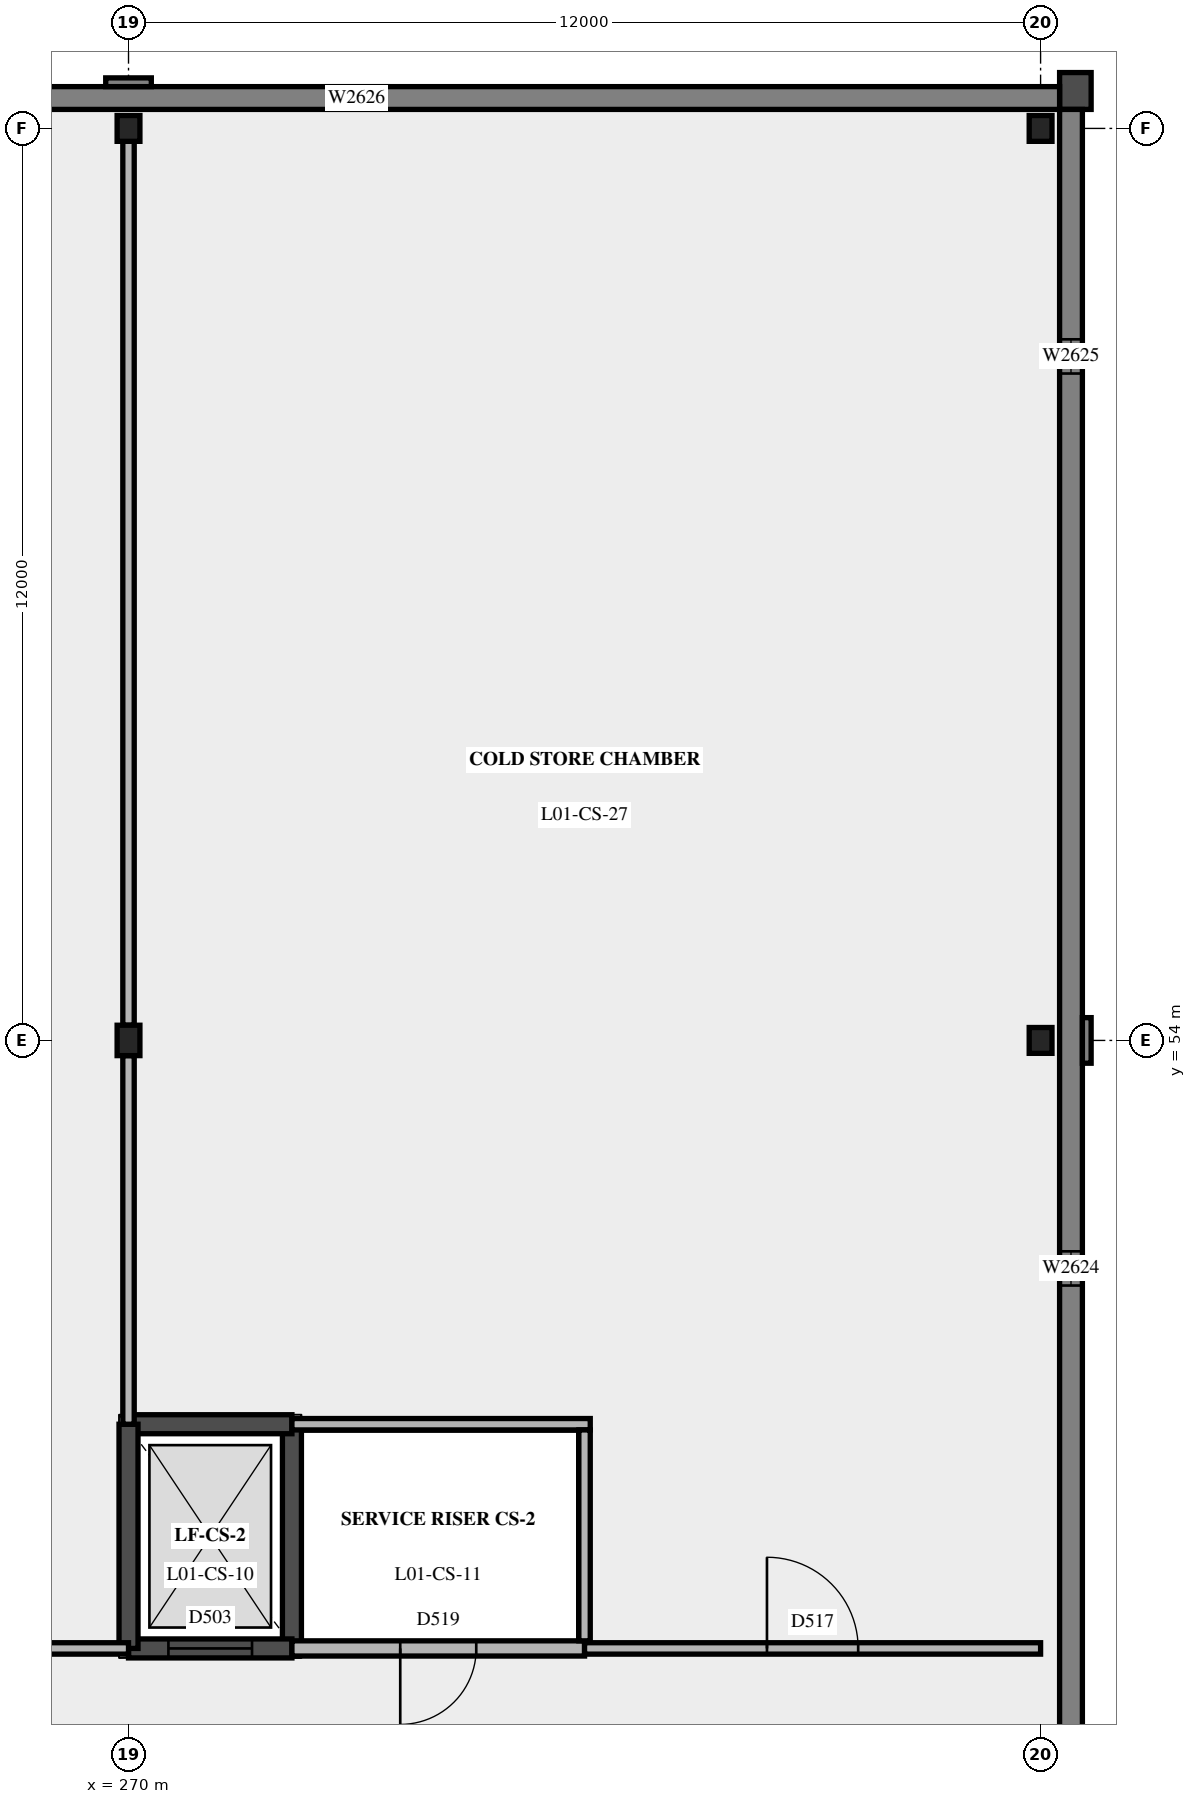
"""IFC4 building model, lengths in metres.
Left out: names, types, materials, properties, quantities, classifications, styles, units other than length and angle.
Written with IfcOpenShell. Run it as: python <this file> out.ifc"""

import sys

from ifc_helpers import new_model, si_unit, direction, frame, frame_2d, origin, origin_2d, place, context, subcontext, project, spatial, polyline, rectangle, i_section, outline, extrude, element, fill, save


model = new_model("IFC4")
c1 = context("Model", 3, precision=1e-05, world=origin(), true_north=direction((0.0, 1.0)))
c2 = subcontext(c1, "Body", "Model", "MODEL_VIEW")
j1 = project(units=[si_unit("LENGTHUNIT", "METRE"), si_unit("PLANEANGLEUNIT", "RADIAN")], contexts=[c1])
p1 = place(None, origin())
s1 = spatial("IfcSite", under=j1, at=p1, CompositionType="ELEMENT")
p2 = place(p1, origin())
s2 = spatial("IfcBuilding", under=s1, at=p2, CompositionType="ELEMENT")
p3 = place(p2, frame((0.0, 0.0, 5.4)))
s3 = spatial("IfcBuildingStorey", under=s2, at=p3, CompositionType="ELEMENT", Elevation=5.4)
p4 = place(p3, frame((270.0, 54.0, 0.0), z_axis=(0.0, 0.0, 1.0), x_axis=(1.0, 0.0, 0.0)))
e1 = element("IfcColumn", 1, at=p4, inside=s3, PredefinedType="COLUMN", context=c2, shape_type="SweptSolid", body=[
    extrude(i_section(OverallWidth=0.3, OverallDepth=0.4, WebThickness=0.013, FlangeThickness=0.024, at=origin_2d()), origin(), (0.0, 0.0, 1.0), 5.4),
])
for number, where, z_axis, x_axis in (
    (2, (270.0, 66.0, 0.0), (0.0, 0.0, 1.0), (1.0, 0.0, 0.0)),
    (3, (282.0, 54.0, 0.0), (0.0, 0.0, 1.0), (1.0, 0.0, 0.0)),
    (4, (282.0, 66.0, 0.0), (0.0, 0.0, 1.0), (1.0, 0.0, 0.0)),
):
    element("IfcColumn", number, at=place(p3, frame(where, z_axis=z_axis, x_axis=x_axis)), inside=s3, PredefinedType="COLUMN", context=c2, shape_type="SweptSolid", body=[
        extrude(i_section(OverallWidth=0.3, OverallDepth=0.34, WebThickness=0.012, FlangeThickness=0.021, at=origin_2d()), origin(), (0.0, 0.0, 1.0), 5.4),
    ])
p5 = place(p3, frame((282.25, 66.528, -0.39), z_axis=(0.0, 0.0, 1.0), x_axis=(1.0, 0.0, 0.0)))
e5 = element("IfcWall", 5, at=p5, inside=s3, PredefinedType="SOLIDWALL", context=c2, shape_type="SweptSolid", body=[
    extrude(rectangle(XDim=0.53, YDim=0.555, at=frame_2d((0.265, 0.0))), origin(), (0.0, 0.0, 1.0), 0.13),
])
p6 = place(p3, frame((282.25, 66.562, -0.26), z_axis=(0.0, 0.0, 1.0), x_axis=(1.0, 0.0, 0.0)))
e6 = element("IfcWall", 6, at=p6, inside=s3, PredefinedType="SOLIDWALL", context=c2, shape_type="SweptSolid", body=[
    extrude(rectangle(XDim=0.645, YDim=0.625, at=frame_2d((0.323, 0.0))), origin(), (0.0, 0.0, 1.0), 0.13),
])
p7 = place(p3, frame((282.25, 66.597, -0.13), z_axis=(0.0, 0.0, 1.0), x_axis=(1.0, 0.0, 0.0)))
e7 = element("IfcWall", 7, at=p7, inside=s3, PredefinedType="SOLIDWALL", context=c2, shape_type="SweptSolid", body=[
    extrude(rectangle(XDim=0.76, YDim=0.695, at=frame_2d((0.38, 0.0))), origin(), (0.0, 0.0, 1.0), 0.13),
])
p8 = place(p3, frame((282.25, 66.492, 0.0), z_axis=(0.0, 0.0, 1.0), x_axis=(1.0, 0.0, 0.0)))
e8 = element("IfcWall", 8, at=p8, inside=s3, PredefinedType="SOLIDWALL", context=c2, shape_type="SweptSolid", body=[
    extrude(rectangle(XDim=0.415, YDim=0.485, at=frame_2d((0.208, 0.0))), origin(), (0.0, 0.0, 1.0), 5.01),
])
p9 = place(p3, frame((282.25, 66.528, 5.01), z_axis=(0.0, 0.0, 1.0), x_axis=(1.0, 0.0, 0.0)))
e9 = element("IfcWall", 9, at=p9, inside=s3, PredefinedType="SOLIDWALL", context=c2, shape_type="SweptSolid", body=[
    extrude(rectangle(XDim=0.53, YDim=0.555, at=frame_2d((0.265, 0.0))), origin(), (0.0, 0.0, 1.0), 0.13),
])
p10 = place(p3, frame((282.25, 66.562, 5.14), z_axis=(0.0, 0.0, 1.0), x_axis=(1.0, 0.0, 0.0)))
e10 = element("IfcWall", 10, at=p10, inside=s3, PredefinedType="SOLIDWALL", context=c2, shape_type="SweptSolid", body=[
    extrude(rectangle(XDim=0.645, YDim=0.625, at=frame_2d((0.323, 0.0))), origin(), (0.0, 0.0, 1.0), 0.13),
])
p11 = place(p3, frame((282.25, 66.597, 5.27), z_axis=(0.0, 0.0, 1.0), x_axis=(1.0, 0.0, 0.0)))
e11 = element("IfcWall", 11, at=p11, inside=s3, PredefinedType="SOLIDWALL", context=c2, shape_type="SweptSolid", body=[
    extrude(rectangle(XDim=0.76, YDim=0.695, at=frame_2d((0.38, 0.0))), origin(), (0.0, 0.0, 1.0), 0.13),
])
p12 = place(p3, frame((282.4, 17.75, 0.0), z_axis=(0.0, 0.0, 1.0), x_axis=(0.0, 1.0, 0.0)))
e12 = element("IfcWall", 12, at=p12, inside=s3, PredefinedType="SOLIDWALL", context=c2, shape_type="SweptSolid", body=[
    extrude(rectangle(XDim=48.5, YDim=0.3, at=frame_2d((24.25, 0.0))), origin(), (0.0, 0.0, 1.0), 5.4),
])
p13 = place(p12, frame((9.025, 0.0, 1.8)))
e13 = element("IfcOpeningElement", 13, at=p13, cuts=e12, PredefinedType="OPENING", context=c2, shape_type="SweptSolid", body=[
    extrude(rectangle(XDim=0.45, YDim=2.4, at=frame_2d((0.225, 1.2))), frame((0.0, 0.16, 0.0), z_axis=(0.0, -1.0, 0.0), x_axis=(1.0, 0.0, 0.0)), (0.0, 0.0, 1.0), 0.32),
])
p14 = place(p12, frame((33.025, 0.0, 1.8)))
e14 = element("IfcOpeningElement", 14, at=p14, cuts=e12, PredefinedType="OPENING", context=c2, shape_type="SweptSolid", body=[
    extrude(rectangle(XDim=0.45, YDim=2.4, at=frame_2d((0.225, 1.2))), frame((0.0, 0.16, 0.0), z_axis=(0.0, -1.0, 0.0), x_axis=(1.0, 0.0, 0.0)), (0.0, 0.0, 1.0), 0.32),
])
p15 = place(p12, frame((45.025, 0.0, 1.8)))
e15 = element("IfcOpeningElement", 15, at=p15, cuts=e12, PredefinedType="OPENING", context=c2, shape_type="SweptSolid", body=[
    extrude(rectangle(XDim=0.45, YDim=2.4, at=frame_2d((0.225, 1.2))), frame((0.0, 0.16, 0.0), z_axis=(0.0, -1.0, 0.0), x_axis=(1.0, 0.0, 0.0)), (0.0, 0.0, 1.0), 0.32),
])
p16 = place(p3, frame((282.607, 53.7, 0.0), z_axis=(0.0, 0.0, 1.0), x_axis=(0.0, 1.0, 0.0)))
e16 = element("IfcWall", 16, at=p16, inside=s3, PredefinedType="SOLIDWALL", context=c2, shape_type="SweptSolid", body=[
    extrude(rectangle(XDim=0.6, YDim=0.115, at=frame_2d((0.3, 0.0))), origin(), (0.0, 0.0, 1.0), 5.4),
])
p17 = place(p3, frame((282.25, 66.4, 0.0), z_axis=(0.0, 0.0, 1.0), x_axis=(-1.0, 0.0, 0.0)))
e17 = element("IfcWall", 17, at=p17, inside=s3, PredefinedType="SOLIDWALL", context=c2, shape_type="SweptSolid", body=[
    extrude(rectangle(XDim=84.5, YDim=0.3, at=frame_2d((42.25, 0.0))), origin(), (0.0, 0.0, 1.0), 5.4),
])
p18 = place(p17, frame((9.025, 0.0, 1.8)))
e18 = element("IfcOpeningElement", 18, at=p18, cuts=e17, PredefinedType="OPENING", context=c2, shape_type="SweptSolid", body=[
    extrude(rectangle(XDim=0.45, YDim=2.4, at=frame_2d((0.225, 1.2))), frame((0.0, 0.16, 0.0), z_axis=(0.0, -1.0, 0.0), x_axis=(1.0, 0.0, 0.0)), (0.0, 0.0, 1.0), 0.32),
])
p19 = place(p17, frame((21.025, 0.0, 1.8)))
e19 = element("IfcOpeningElement", 19, at=p19, cuts=e17, PredefinedType="OPENING", context=c2, shape_type="SweptSolid", body=[
    extrude(rectangle(XDim=0.45, YDim=2.4, at=frame_2d((0.225, 1.2))), frame((0.0, 0.16, 0.0), z_axis=(0.0, -1.0, 0.0), x_axis=(1.0, 0.0, 0.0)), (0.0, 0.0, 1.0), 0.32),
])
p20 = place(p17, frame((33.025, 0.0, 1.8)))
e20 = element("IfcOpeningElement", 20, at=p20, cuts=e17, PredefinedType="OPENING", context=c2, shape_type="SweptSolid", body=[
    extrude(rectangle(XDim=0.45, YDim=2.4, at=frame_2d((0.225, 1.2))), frame((0.0, 0.16, 0.0), z_axis=(0.0, -1.0, 0.0), x_axis=(1.0, 0.0, 0.0)), (0.0, 0.0, 1.0), 0.32),
])
p21 = place(p17, frame((45.025, 0.0, 1.8)))
e21 = element("IfcOpeningElement", 21, at=p21, cuts=e17, PredefinedType="OPENING", context=c2, shape_type="SweptSolid", body=[
    extrude(rectangle(XDim=0.45, YDim=2.4, at=frame_2d((0.225, 1.2))), frame((0.0, 0.16, 0.0), z_axis=(0.0, -1.0, 0.0), x_axis=(1.0, 0.0, 0.0)), (0.0, 0.0, 1.0), 0.32),
])
p22 = place(p17, frame((57.025, 0.0, 1.8)))
e22 = element("IfcOpeningElement", 22, at=p22, cuts=e17, PredefinedType="OPENING", context=c2, shape_type="SweptSolid", body=[
    extrude(rectangle(XDim=0.45, YDim=2.4, at=frame_2d((0.225, 1.2))), frame((0.0, 0.16, 0.0), z_axis=(0.0, -1.0, 0.0), x_axis=(1.0, 0.0, 0.0)), (0.0, 0.0, 1.0), 0.32),
])
p23 = place(p17, frame((69.025, 0.0, 1.8)))
e23 = element("IfcOpeningElement", 23, at=p23, cuts=e17, PredefinedType="OPENING", context=c2, shape_type="SweptSolid", body=[
    extrude(rectangle(XDim=0.45, YDim=2.4, at=frame_2d((0.225, 1.2))), frame((0.0, 0.16, 0.0), z_axis=(0.0, -1.0, 0.0), x_axis=(1.0, 0.0, 0.0)), (0.0, 0.0, 1.0), 0.32),
])
p24 = place(p17, frame((81.025, 0.0, 1.8)))
e24 = element("IfcOpeningElement", 24, at=p24, cuts=e17, PredefinedType="OPENING", context=c2, shape_type="SweptSolid", body=[
    extrude(rectangle(XDim=0.45, YDim=2.4, at=frame_2d((0.225, 1.2))), frame((0.0, 0.16, 0.0), z_axis=(0.0, -1.0, 0.0), x_axis=(1.0, 0.0, 0.0)), (0.0, 0.0, 1.0), 0.32),
])
p25 = place(p3, frame((270.3, 66.607, 0.0), z_axis=(0.0, 0.0, 1.0), x_axis=(-1.0, 0.0, 0.0)))
e25 = element("IfcWall", 25, at=p25, inside=s3, PredefinedType="SOLIDWALL", context=c2, shape_type="SweptSolid", body=[
    extrude(rectangle(XDim=0.6, YDim=0.115, at=frame_2d((0.3, 0.0))), origin(), (0.0, 0.0, 1.0), 5.4),
])
p26 = place(p3, frame((272.15, 46.0, 0.0), z_axis=(0.0, 0.0, 1.0), x_axis=(0.0, 1.0, 0.0)))
e26 = element("IfcWall", 26, at=p26, inside=s3, PredefinedType="SHEAR", context=c2, shape_type="SweptSolid", body=[
    extrude(rectangle(XDim=2.95, YDim=0.25, at=frame_2d((1.475, 0.0))), origin(), (0.0, 0.0, 1.0), 5.4),
])
p27 = place(p3, frame((272.15, 48.95, 0.0), z_axis=(0.0, 0.0, 1.0), x_axis=(-1.0, 0.0, 0.0)))
e27 = element("IfcWall", 27, at=p27, inside=s3, PredefinedType="SHEAR", context=c2, shape_type="SweptSolid", body=[
    extrude(rectangle(XDim=2.15, YDim=0.25, at=frame_2d((1.075, 0.0))), origin(), (0.0, 0.0, 1.0), 5.4),
])
p28 = place(p3, frame((270.0, 46.0, 0.0), z_axis=(0.0, 0.0, 1.0), x_axis=(1.0, 0.0, 0.0)))
e28 = element("IfcWall", 28, at=p28, inside=s3, PredefinedType="SHEAR", context=c2, shape_type="SweptSolid", body=[
    extrude(rectangle(XDim=2.15, YDim=0.25, at=frame_2d((1.075, 0.0))), origin(), (0.0, 0.0, 1.0), 5.4),
])
p29 = place(p28, frame((0.525, 0.0, 0.0)))
e29 = element("IfcOpeningElement", 29, at=p29, cuts=e28, PredefinedType="OPENING", context=c2, shape_type="SweptSolid", body=[
    extrude(rectangle(XDim=1.1, YDim=2.1, at=frame_2d((0.55, 1.05))), frame((0.0, 0.135, 0.0), z_axis=(0.0, -1.0, 0.0), x_axis=(1.0, 0.0, 0.0)), (0.0, 0.0, 1.0), 0.27),
])
p30 = place(p3, frame((270.0, 48.95, 0.0), z_axis=(0.0, 0.0, 1.0), x_axis=(0.0, -1.0, 0.0)))
e30 = element("IfcWall", 30, at=p30, inside=s3, PredefinedType="SHEAR", context=c2, shape_type="SweptSolid", body=[
    extrude(rectangle(XDim=2.95, YDim=0.25, at=frame_2d((1.475, 0.0))), origin(), (0.0, 0.0, 1.0), 5.4),
])
p31 = place(p3, frame((252.0, 46.0, 0.0), z_axis=(0.0, 0.0, 1.0), x_axis=(1.0, 0.0, 0.0)))
e31 = element("IfcWall", 31, at=p31, inside=s3, PredefinedType="PARTITIONING", context=c2, shape_type="SweptSolid", body=[
    extrude(outline(polyline([(0.0, 0.0), (18.0, 0.0), (18.0, 5.15), (15.705, 5.15), (15.7, 4.63), (15.5, 4.63), (15.495, 5.15), (13.305, 5.15), (13.3, 4.63), (13.1, 4.63), (13.095, 5.15), (10.905, 5.15), (10.9, 4.63), (10.7, 4.63), (10.695, 5.15), (8.505, 5.15), (8.5, 4.63), (8.3, 4.63), (8.295, 5.15), (6.1, 5.15), (6.095, 4.68), (5.905, 4.68), (5.9, 5.15), (3.705, 5.15), (3.7, 4.63), (3.5, 4.63), (3.495, 5.15), (1.305, 5.15), (1.3, 4.63), (1.1, 4.63), (1.095, 5.15), (0.0, 5.15), (0.0, 0.0)])), frame((0.0, 0.075, 0.0), z_axis=(0.0, -1.0, 0.0), x_axis=(1.0, 0.0, 0.0)), (0.0, 0.0, 1.0), 0.15),
])
p32 = place(p31, frame((8.4, 0.0, 0.0)))
e32 = element("IfcOpeningElement", 32, at=p32, cuts=e31, PredefinedType="OPENING", context=c2, shape_type="SweptSolid", body=[
    extrude(rectangle(XDim=1.2, YDim=2.4, at=frame_2d((0.6, 1.2))), frame((0.0, 0.085, 0.0), z_axis=(0.0, -1.0, 0.0), x_axis=(1.0, 0.0, 0.0)), (0.0, 0.0, 1.0), 0.17),
])
p33 = place(p3, frame((272.15, 46.0, 0.0), z_axis=(0.0, 0.0, 1.0), x_axis=(1.0, 0.0, 0.0)))
e33 = element("IfcWall", 33, at=p33, inside=s3, PredefinedType="PARTITIONING", context=c2, shape_type="SweptSolid", body=[
    extrude(outline(polyline([(0.0, 0.0), (3.85, 0.0), (3.85, 5.15), (2.755, 5.15), (2.75, 4.63), (2.55, 4.63), (2.545, 5.15), (0.355, 5.15), (0.35, 4.63), (0.15, 4.63), (0.145, 5.15), (0.0, 5.15), (0.0, 0.0)])), frame((0.0, 0.1, 0.0), z_axis=(0.0, -1.0, 0.0), x_axis=(1.0, 0.0, 0.0)), (0.0, 0.0, 1.0), 0.2),
])
p34 = place(p33, frame((1.425, 0.0, 0.0)))
e34 = element("IfcOpeningElement", 34, at=p34, cuts=e33, PredefinedType="OPENING", context=c2, shape_type="SweptSolid", body=[
    extrude(rectangle(XDim=1.0, YDim=2.1, at=frame_2d((0.5, 1.05))), frame((0.0, 0.11, 0.0), z_axis=(0.0, -1.0, 0.0), x_axis=(1.0, 0.0, 0.0)), (0.0, 0.0, 1.0), 0.22),
])
p35 = place(p3, frame((276.0, 46.0, 0.0), z_axis=(0.0, 0.0, 1.0), x_axis=(1.0, 0.0, 0.0)))
e35 = element("IfcWall", 35, at=p35, inside=s3, PredefinedType="PARTITIONING", context=c2, shape_type="SweptSolid", body=[
    extrude(outline(polyline([(0.0, 0.0), (6.0, 0.0), (6.0, 4.68), (5.905, 4.68), (5.9, 5.15), (3.705, 5.15), (3.7, 4.63), (3.5, 4.63), (3.495, 5.15), (1.305, 5.15), (1.3, 4.63), (1.1, 4.63), (1.095, 5.15), (0.0, 5.15), (0.0, 0.0)])), frame((0.0, 0.075, 0.0), z_axis=(0.0, -1.0, 0.0), x_axis=(1.0, 0.0, 0.0)), (0.0, 0.0, 1.0), 0.15),
])
p36 = place(p35, frame((2.4, 0.0, 0.0)))
e36 = element("IfcOpeningElement", 36, at=p36, cuts=e35, PredefinedType="OPENING", context=c2, shape_type="SweptSolid", body=[
    extrude(rectangle(XDim=1.2, YDim=2.4, at=frame_2d((0.6, 1.2))), frame((0.0, 0.085, 0.0), z_axis=(0.0, -1.0, 0.0), x_axis=(1.0, 0.0, 0.0)), (0.0, 0.0, 1.0), 0.17),
])
p37 = place(p3, frame((272.15, 48.95, 0.0), z_axis=(0.0, 0.0, 1.0), x_axis=(1.0, 0.0, 0.0)))
e37 = element("IfcWall", 37, at=p37, inside=s3, PredefinedType="PARTITIONING", context=c2, shape_type="SweptSolid", body=[
    extrude(outline(polyline([(0.0, 0.0), (3.925, 0.0), (3.925, 5.15), (2.755, 5.15), (2.75, 4.63), (2.55, 4.63), (2.545, 5.15), (0.355, 5.15), (0.35, 4.63), (0.15, 4.63), (0.145, 5.15), (0.0, 5.15), (0.0, 0.0)])), frame((0.0, 0.075, 0.0), z_axis=(0.0, -1.0, 0.0), x_axis=(1.0, 0.0, 0.0)), (0.0, 0.0, 1.0), 0.15),
])
p38 = place(p3, frame((270.0, 48.95, 0.0), z_axis=(0.0, 0.0, 1.0), x_axis=(0.0, 1.0, 0.0)))
e38 = element("IfcWall", 38, at=p38, inside=s3, PredefinedType="PARTITIONING", context=c2, shape_type="SweptSolid", body=[
    extrude(rectangle(XDim=4.85, YDim=0.15, at=frame_2d((2.425, 0.0))), origin(), (0.0, 0.0, 1.0), 4.68),
])
p39 = place(p3, frame((270.0, 54.2, 0.0), z_axis=(0.0, 0.0, 1.0), x_axis=(0.0, 1.0, 0.0)))
e39 = element("IfcWall", 39, at=p39, inside=s3, PredefinedType="PARTITIONING", context=c2, shape_type="SweptSolid", body=[
    extrude(rectangle(XDim=11.63, YDim=0.15, at=frame_2d((5.815, 0.0))), origin(), (0.0, 0.0, 1.0), 4.68),
])
p40 = place(p3, frame((276.0, 46.1, 0.0), z_axis=(0.0, 0.0, 1.0), x_axis=(0.0, 1.0, 0.0)))
e40 = element("IfcWall", 40, at=p40, inside=s3, PredefinedType="PARTITIONING", context=c2, shape_type="SweptSolid", body=[
    extrude(rectangle(XDim=2.775, YDim=0.15, at=frame_2d((1.387, 0.0))), origin(), (0.0, 0.0, 1.0), 5.15),
])
p41 = place(p14, origin())
e41 = element("IfcWindow", 41, at=p41, inside=s3, PartitioningType="SINGLE_PANEL", PredefinedType="WINDOW", context=c2, shape_type="SweptSolid", body=[
    extrude(rectangle(XDim=0.45, YDim=2.4, at=frame_2d((0.225, 1.2))), frame((0.0, 0.03, 0.0), z_axis=(0.0, -1.0, 0.0), x_axis=(1.0, 0.0, 0.0)), (0.0, 0.0, 1.0), 0.06),
])
fill(e14, e41)
p42 = place(p15, origin())
e42 = element("IfcWindow", 42, at=p42, inside=s3, PartitioningType="SINGLE_PANEL", PredefinedType="WINDOW", context=c2, shape_type="SweptSolid", body=[
    extrude(rectangle(XDim=0.45, YDim=2.4, at=frame_2d((0.225, 1.2))), frame((0.0, 0.03, 0.0), z_axis=(0.0, -1.0, 0.0), x_axis=(1.0, 0.0, 0.0)), (0.0, 0.0, 1.0), 0.06),
])
fill(e15, e42)
p43 = place(p18, origin())
e43 = element("IfcWindow", 43, at=p43, inside=s3, PartitioningType="SINGLE_PANEL", PredefinedType="WINDOW", context=c2, shape_type="SweptSolid", body=[
    extrude(rectangle(XDim=0.45, YDim=2.4, at=frame_2d((0.225, 1.2))), frame((0.0, 0.03, 0.0), z_axis=(0.0, -1.0, 0.0), x_axis=(1.0, 0.0, 0.0)), (0.0, 0.0, 1.0), 0.06),
])
fill(e18, e43)
p44 = place(p29, origin())
e44 = element("IfcDoor", 44, at=p44, inside=s3, OperationType="SLIDING_TO_LEFT", PredefinedType="DOOR", context=c2, shape_type="SweptSolid", body=[
    extrude(rectangle(XDim=1.1, YDim=2.1, at=frame_2d((0.55, 1.05))), frame((0.0, 0.025, 0.0), z_axis=(0.0, -1.0, 0.0), x_axis=(1.0, 0.0, 0.0)), (0.0, 0.0, 1.0), 0.05),
])
fill(e29, e44)
p45 = place(p36, origin())
e45 = element("IfcDoor", 45, at=p45, inside=s3, OperationType="SINGLE_SWING_LEFT", PredefinedType="DOOR", context=c2, shape_type="SweptSolid", body=[
    extrude(rectangle(XDim=1.2, YDim=2.4, at=frame_2d((0.6, 1.2))), frame((0.0, 0.025, 0.0), z_axis=(0.0, -1.0, 0.0), x_axis=(1.0, 0.0, 0.0)), (0.0, 0.0, 1.0), 0.05),
])
fill(e36, e45)
p46 = place(p34, origin())
e46 = element("IfcDoor", 46, at=p46, inside=s3, OperationType="SINGLE_SWING_RIGHT", PredefinedType="DOOR", context=c2, shape_type="SweptSolid", body=[
    extrude(rectangle(XDim=1.0, YDim=2.1, at=frame_2d((0.5, 1.05))), frame((0.0, 0.025, 0.0), z_axis=(0.0, -1.0, 0.0), x_axis=(1.0, 0.0, 0.0)), (0.0, 0.0, 1.0), 0.05),
])
fill(e34, e46)
save(model, sys.argv[1])
